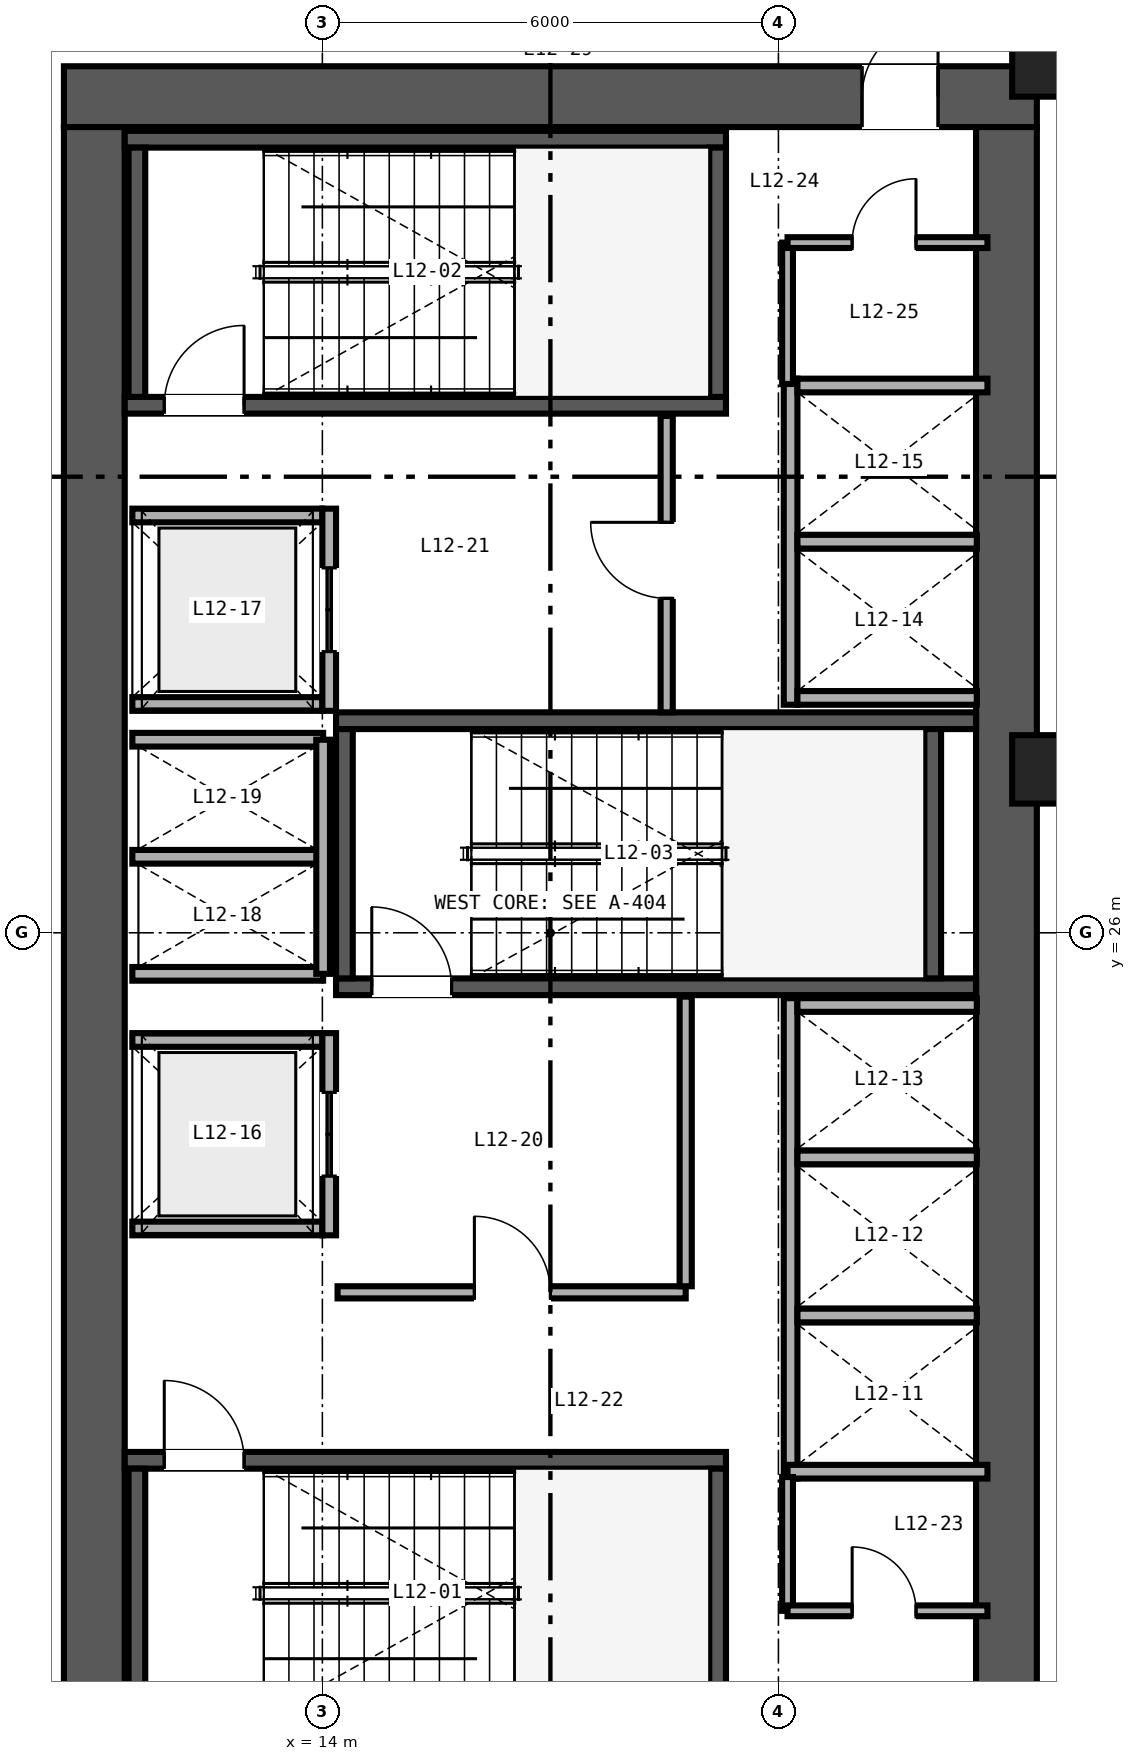
"""IFC4 building model, lengths in metres.
Left out: names, types, materials, properties, quantities, classifications, styles, units other than length and angle.
Written with IfcOpenShell. Run it as: python <this file> out.ifc"""

import sys

from ifc_helpers import new_model, si_unit, direction, frame, frame_2d, origin, origin_2d, place, context, subcontext, project, spatial, rectangle, hollow_rectangle, extrude, source, transform, mapped, element, fill, save


model = new_model("IFC4")
c1 = context("Model", 3, precision=1e-05, world=origin(), true_north=direction((0.0, 1.0)))
c2 = subcontext(c1, "Body", "Model", "MODEL_VIEW")
j1 = project(units=[si_unit("LENGTHUNIT", "METRE"), si_unit("PLANEANGLEUNIT", "RADIAN")], contexts=[c1])
p1 = place(None, origin())
s1 = spatial("IfcSite", under=j1, at=p1, CompositionType="ELEMENT")
p2 = place(p1, origin())
s2 = spatial("IfcBuilding", under=s1, at=p2, CompositionType="ELEMENT")
p3 = place(p2, frame((0.0, 0.0, 52.8)))
s3 = spatial("IfcBuildingStorey", under=s2, at=p3, CompositionType="ELEMENT", Elevation=52.8)
p4 = place(p3, frame((10.6, 37.0, 0.0), z_axis=(0.0, 0.0, 1.0), x_axis=(1.0, 0.0, 0.0)))
e1 = element("IfcWall", 1, at=p4, inside=s3, PredefinedType="SHEAR", context=c2, shape_type="SweptSolid", body=[
    extrude(rectangle(XDim=12.8, YDim=0.8, at=frame_2d((6.4, 0.0))), origin(), (0.0, 0.0, 1.0), 3.35),
])
p5 = place(p4, frame((10.5, 0.0, 0.0)))
e2 = element("IfcOpeningElement", 2, at=p5, cuts=e1, PredefinedType="OPENING", context=c2, shape_type="SweptSolid", body=[
    extrude(rectangle(XDim=1.0, YDim=2.15, at=frame_2d((0.5, 1.075))), frame((0.0, 0.41, 0.0), z_axis=(0.0, -1.0, 0.0), x_axis=(1.0, 0.0, 0.0)), (0.0, 0.0, 1.0), 0.82),
])
for number, where, z_axis, x_axis in (
    (3, (11.0, 15.4, 0.0), (0.0, 0.0, 1.0), (0.0, 1.0, 0.0)),
    (4, (23.0, 15.4, 0.0), (0.0, 0.0, 1.0), (0.0, 1.0, 0.0)),
):
    element("IfcWall", number, at=place(p3, frame(where, z_axis=z_axis, x_axis=x_axis)), inside=s3, PredefinedType="SHEAR", context=c2, shape_type="SweptSolid", body=[
        extrude(rectangle(XDim=21.2, YDim=0.8, at=frame_2d((10.6, 0.0))), origin(), (0.0, 0.0, 1.0), 3.35),
    ])
p6 = place(p3, frame((11.4, 19.06, 0.0), z_axis=(0.0, 0.0, 1.0), x_axis=(1.0, 0.0, 0.0)))
e5 = element("IfcWall", 5, at=p6, inside=s3, PredefinedType="SHEAR", context=c2, shape_type="SweptSolid", body=[
    extrude(rectangle(XDim=7.91, YDim=0.22, at=frame_2d((3.955, 0.0))), origin(), (0.0, 0.0, 1.0), 3.4),
])
p7 = place(p6, frame((0.52, 0.0, 0.0)))
e6 = element("IfcOpeningElement", 6, at=p7, cuts=e5, PredefinedType="OPENING", context=c2, shape_type="SweptSolid", body=[
    extrude(rectangle(XDim=1.05, YDim=2.15, at=frame_2d((0.525, 1.075))), frame((0.0, 0.12, 0.0), z_axis=(0.0, -1.0, 0.0), x_axis=(1.0, 0.0, 0.0)), (0.0, 0.0, 1.0), 0.24),
])
for number, where, z_axis, x_axis in (
    (7, (11.56, 15.67, 0.0), (0.0, 0.0, 1.0), (0.0, 1.0, 0.0)),
    (8, (19.2, 15.67, 0.0), (0.0, 0.0, 1.0), (0.0, 1.0, 0.0)),
):
    element("IfcWall", number, at=place(p3, frame(where, z_axis=z_axis, x_axis=x_axis)), inside=s3, PredefinedType="SHEAR", context=c2, shape_type="SweptSolid", body=[
        extrude(rectangle(XDim=3.28, YDim=0.22, at=frame_2d((1.64, 0.0))), origin(), (0.0, 0.0, 1.0), 3.4),
    ])
p8 = place(p3, frame((11.4, 32.94, 0.0), z_axis=(0.0, 0.0, 1.0), x_axis=(1.0, 0.0, 0.0)))
e9 = element("IfcWall", 9, at=p8, inside=s3, PredefinedType="SHEAR", context=c2, shape_type="SweptSolid", body=[
    extrude(rectangle(XDim=7.91, YDim=0.22, at=frame_2d((3.955, 0.0))), origin(), (0.0, 0.0, 1.0), 3.4),
])
p9 = place(p8, frame((0.52, 0.0, 0.0)))
e10 = element("IfcOpeningElement", 10, at=p9, cuts=e9, PredefinedType="OPENING", context=c2, shape_type="SweptSolid", body=[
    extrude(rectangle(XDim=1.05, YDim=2.15, at=frame_2d((0.525, 1.075))), frame((0.0, 0.12, 0.0), z_axis=(0.0, -1.0, 0.0), x_axis=(1.0, 0.0, 0.0)), (0.0, 0.0, 1.0), 0.24),
])
p10 = place(p3, frame((11.4, 36.44, 0.0), z_axis=(0.0, 0.0, 1.0), x_axis=(1.0, 0.0, 0.0)))
e11 = element("IfcWall", 11, at=p10, inside=s3, PredefinedType="SHEAR", context=c2, shape_type="SweptSolid", body=[
    extrude(rectangle(XDim=7.91, YDim=0.22, at=frame_2d((3.955, 0.0))), origin(), (0.0, 0.0, 1.0), 3.4),
])
for number, where, z_axis, x_axis in (
    (12, (11.56, 33.05, 0.0), (0.0, 0.0, 1.0), (0.0, 1.0, 0.0)),
    (13, (19.2, 33.05, 0.0), (0.0, 0.0, 1.0), (0.0, 1.0, 0.0)),
):
    element("IfcWall", number, at=place(p3, frame(where, z_axis=z_axis, x_axis=x_axis)), inside=s3, PredefinedType="SHEAR", context=c2, shape_type="SweptSolid", body=[
        extrude(rectangle(XDim=3.28, YDim=0.22, at=frame_2d((1.64, 0.0))), origin(), (0.0, 0.0, 1.0), 3.4),
    ])
p11 = place(p3, frame((14.18, 25.29, 0.0), z_axis=(0.0, 0.0, 1.0), x_axis=(1.0, 0.0, 0.0)))
e14 = element("IfcWall", 14, at=p11, inside=s3, PredefinedType="SHEAR", context=c2, shape_type="SweptSolid", body=[
    extrude(rectangle(XDim=8.42, YDim=0.22, at=frame_2d((4.21, 0.0))), origin(), (0.0, 0.0, 1.0), 3.4),
])
p12 = place(p11, frame((0.47, 0.0, 0.0)))
e15 = element("IfcOpeningElement", 15, at=p12, cuts=e14, PredefinedType="OPENING", context=c2, shape_type="SweptSolid", body=[
    extrude(rectangle(XDim=1.05, YDim=2.15, at=frame_2d((0.525, 1.075))), frame((0.0, 0.12, 0.0), z_axis=(0.0, -1.0, 0.0), x_axis=(1.0, 0.0, 0.0)), (0.0, 0.0, 1.0), 0.24),
])
p13 = place(p3, frame((14.18, 28.79, 0.0), z_axis=(0.0, 0.0, 1.0), x_axis=(1.0, 0.0, 0.0)))
e16 = element("IfcWall", 16, at=p13, inside=s3, PredefinedType="SHEAR", context=c2, shape_type="SweptSolid", body=[
    extrude(rectangle(XDim=8.42, YDim=0.22, at=frame_2d((4.21, 0.0))), origin(), (0.0, 0.0, 1.0), 3.4),
])
for number, where, z_axis, x_axis in (
    (17, (14.29, 25.4, 0.0), (0.0, 0.0, 1.0), (0.0, 1.0, 0.0)),
    (18, (22.03, 25.4, 0.0), (0.0, 0.0, 1.0), (0.0, 1.0, 0.0)),
):
    element("IfcWall", number, at=place(p3, frame(where, z_axis=z_axis, x_axis=x_axis)), inside=s3, PredefinedType="SHEAR", context=c2, shape_type="SweptSolid", body=[
        extrude(rectangle(XDim=3.28, YDim=0.22, at=frame_2d((1.64, 0.0))), origin(), (0.0, 0.0, 1.0), 3.4),
    ])
m1 = source(origin(), c2, "Body", "SweptSolid", [
    extrude(hollow_rectangle(XDim=0.85, YDim=0.9, WallThickness=0.04, at=origin_2d()), origin(), (0.0, 0.0, 1.0), 3.35),
])
for number, where, z_axis, x_axis in (
    (19, (23.5, 28.15, 0.0), (0.0, 0.0, 1.0), (1.0, 0.0, 0.0)),
    (20, (23.5, 37.45, 0.0), (0.0, 0.0, 1.0), (1.0, 0.0, 0.0)),
):
    element("IfcColumn", number, at=place(p3, frame(where, z_axis=z_axis, x_axis=x_axis)), inside=s3, PredefinedType="COLUMN", context=c2, shape_type="MappedRepresentation", body=[
        mapped(m1, transform((0.0, 0.0, 0.0), scale=1.0)),
    ])
p14 = place(p3, frame((20.16, 18.82, 0.0), z_axis=(0.0, 0.0, 1.0), x_axis=(0.0, 1.0, 0.0)))
e21 = element("IfcWall", 21, at=p14, inside=s3, PredefinedType="SOLIDWALL", context=c2, shape_type="SweptSolid", body=[
    extrude(rectangle(XDim=6.32, YDim=0.18, at=frame_2d((3.16, 0.0))), origin(), (0.0, 0.0, 1.0), 2.36),
])
p15 = place(p3, frame((20.12, 18.91, 0.0), z_axis=(0.0, 0.0, 1.0), x_axis=(1.0, 0.0, 0.0)))
e22 = element("IfcWall", 22, at=p15, inside=s3, PredefinedType="SOLIDWALL", context=c2, shape_type="SweptSolid", body=[
    extrude(rectangle(XDim=2.63, YDim=0.18, at=frame_2d((1.315, 0.0))), origin(), (0.0, 0.0, 1.0), 3.35),
])
p16 = place(p3, frame((20.25, 25.05, 0.0), z_axis=(0.0, 0.0, 1.0), x_axis=(1.0, 0.0, 0.0)))
e23 = element("IfcWall", 23, at=p16, inside=s3, PredefinedType="SOLIDWALL", context=c2, shape_type="SweptSolid", body=[
    extrude(rectangle(XDim=2.36, YDim=0.18, at=frame_2d((1.18, 0.0))), origin(), (0.0, 0.0, 1.0), 3.35),
])
p17 = place(p3, frame((20.25, 20.965, 0.0), z_axis=(0.0, 0.0, 1.0), x_axis=(1.0, 0.0, 0.0)))
e24 = element("IfcWall", 24, at=p17, inside=s3, PredefinedType="SOLIDWALL", context=c2, shape_type="SweptSolid", body=[
    extrude(rectangle(XDim=2.36, YDim=0.18, at=frame_2d((1.18, 0.0))), origin(), (0.0, 0.0, 1.0), 2.36),
])
p18 = place(p3, frame((20.25, 23.045, 0.0), z_axis=(0.0, 0.0, 1.0), x_axis=(1.0, 0.0, 0.0)))
e25 = element("IfcWall", 25, at=p18, inside=s3, PredefinedType="SOLIDWALL", context=c2, shape_type="SweptSolid", body=[
    extrude(rectangle(XDim=2.36, YDim=0.18, at=frame_2d((1.18, 0.0))), origin(), (0.0, 0.0, 1.0), 3.35),
])
p19 = place(p3, frame((20.16, 29.0, 0.0), z_axis=(0.0, 0.0, 1.0), x_axis=(0.0, 1.0, 0.0)))
e26 = element("IfcWall", 26, at=p19, inside=s3, PredefinedType="SOLIDWALL", context=c2, shape_type="SweptSolid", body=[
    extrude(rectangle(XDim=4.29, YDim=0.18, at=frame_2d((2.145, 0.0))), origin(), (0.0, 0.0, 1.0), 3.35),
])
p20 = place(p3, frame((20.25, 29.09, 0.0), z_axis=(0.0, 0.0, 1.0), x_axis=(1.0, 0.0, 0.0)))
e27 = element("IfcWall", 27, at=p20, inside=s3, PredefinedType="SOLIDWALL", context=c2, shape_type="SweptSolid", body=[
    extrude(rectangle(XDim=2.36, YDim=0.18, at=frame_2d((1.18, 0.0))), origin(), (0.0, 0.0, 1.0), 3.35),
])
p21 = place(p3, frame((20.25, 33.2, 0.0), z_axis=(0.0, 0.0, 1.0), x_axis=(1.0, 0.0, 0.0)))
e28 = element("IfcWall", 28, at=p21, inside=s3, PredefinedType="SOLIDWALL", context=c2, shape_type="SweptSolid", body=[
    extrude(rectangle(XDim=2.5, YDim=0.18, at=frame_2d((1.25, 0.0))), origin(), (0.0, 0.0, 1.0), 3.35),
])
p22 = place(p3, frame((20.25, 31.145, 0.0), z_axis=(0.0, 0.0, 1.0), x_axis=(1.0, 0.0, 0.0)))
e29 = element("IfcWall", 29, at=p22, inside=s3, PredefinedType="SOLIDWALL", context=c2, shape_type="SweptSolid", body=[
    extrude(rectangle(XDim=2.36, YDim=0.18, at=frame_2d((1.18, 0.0))), origin(), (0.0, 0.0, 1.0), 3.35),
])
for number, where, z_axis, x_axis in (
    (30, (11.5, 22.11, 0.0), (0.0, 0.0, 1.0), (1.0, 0.0, 0.0)),
    (31, (11.5, 24.59, 0.0), (0.0, 0.0, 1.0), (1.0, 0.0, 0.0)),
):
    element("IfcWall", number, at=place(p3, frame(where, z_axis=z_axis, x_axis=x_axis)), inside=s3, PredefinedType="SOLIDWALL", context=c2, shape_type="SweptSolid", body=[
        extrude(rectangle(XDim=2.5, YDim=0.18, at=frame_2d((1.25, 0.0))), origin(), (0.0, 0.0, 1.0), 3.35),
    ])
p23 = place(p3, frame((14.09, 22.02, 0.0), z_axis=(0.0, 0.0, 1.0), x_axis=(0.0, 1.0, 0.0)))
e32 = element("IfcWall", 32, at=p23, inside=s3, PredefinedType="SOLIDWALL", context=c2, shape_type="SweptSolid", body=[
    extrude(rectangle(XDim=2.66, YDim=0.18, at=frame_2d((1.33, 0.0))), origin(), (0.0, 0.0, 1.0), 3.35),
])
p24 = place(p23, frame((0.78, 0.0, 0.0)))
e33 = element("IfcOpeningElement", 33, at=p24, cuts=e32, PredefinedType="OPENING", context=c2, shape_type="SweptSolid", body=[
    extrude(rectangle(XDim=1.1, YDim=2.2, at=frame_2d((0.55, 1.1))), frame((0.0, 0.1, 0.0), z_axis=(0.0, -1.0, 0.0), x_axis=(1.0, 0.0, 0.0)), (0.0, 0.0, 1.0), 0.2),
])
for number, where, z_axis, x_axis in (
    (34, (11.5, 29.01, 0.0), (0.0, 0.0, 1.0), (1.0, 0.0, 0.0)),
    (35, (11.5, 31.49, 0.0), (0.0, 0.0, 1.0), (1.0, 0.0, 0.0)),
):
    element("IfcWall", number, at=place(p3, frame(where, z_axis=z_axis, x_axis=x_axis)), inside=s3, PredefinedType="SOLIDWALL", context=c2, shape_type="SweptSolid", body=[
        extrude(rectangle(XDim=2.5, YDim=0.18, at=frame_2d((1.25, 0.0))), origin(), (0.0, 0.0, 1.0), 3.35),
    ])
p25 = place(p3, frame((14.09, 28.92, 0.0), z_axis=(0.0, 0.0, 1.0), x_axis=(0.0, 1.0, 0.0)))
e36 = element("IfcWall", 36, at=p25, inside=s3, PredefinedType="SOLIDWALL", context=c2, shape_type="SweptSolid", body=[
    extrude(rectangle(XDim=2.66, YDim=0.18, at=frame_2d((1.33, 0.0))), origin(), (0.0, 0.0, 1.0), 3.35),
])
p26 = place(p25, frame((0.78, 0.0, 0.0)))
e37 = element("IfcOpeningElement", 37, at=p26, cuts=e36, PredefinedType="OPENING", context=c2, shape_type="SweptSolid", body=[
    extrude(rectangle(XDim=1.1, YDim=2.2, at=frame_2d((0.55, 1.1))), frame((0.0, 0.1, 0.0), z_axis=(0.0, -1.0, 0.0), x_axis=(1.0, 0.0, 0.0)), (0.0, 0.0, 1.0), 0.2),
])
for number, where, z_axis, x_axis in (
    (38, (11.5, 25.46, 0.0), (0.0, 0.0, 1.0), (1.0, 0.0, 0.0)),
    (39, (11.5, 27.0, 0.0), (0.0, 0.0, 1.0), (1.0, 0.0, 0.0)),
    (40, (11.5, 28.54, 0.0), (0.0, 0.0, 1.0), (1.0, 0.0, 0.0)),
):
    element("IfcWall", number, at=place(p3, frame(where, z_axis=z_axis, x_axis=x_axis)), inside=s3, PredefinedType="SOLIDWALL", context=c2, shape_type="SweptSolid", body=[
        extrude(rectangle(XDim=2.51, YDim=0.18, at=frame_2d((1.255, 0.0))), origin(), (0.0, 0.0, 1.0), 3.35),
    ])
p27 = place(p3, frame((14.01, 25.46, 0.0), z_axis=(0.0, 0.0, 1.0), x_axis=(0.0, 1.0, 0.0)))
e41 = element("IfcWall", 41, at=p27, inside=s3, PredefinedType="SOLIDWALL", context=c2, shape_type="SweptSolid", body=[
    extrude(rectangle(XDim=3.08, YDim=0.18, at=frame_2d((1.54, 0.0))), origin(), (0.0, 0.0, 1.0), 3.35),
])
p28 = place(p3, frame((14.2, 21.27, 0.0), z_axis=(0.0, 0.0, 1.0), x_axis=(1.0, 0.0, 0.0)))
e42 = element("IfcWall", 42, at=p28, inside=s3, PredefinedType="PARTITIONING", context=c2, shape_type="SweptSolid", body=[
    extrude(rectangle(XDim=4.58, YDim=0.16, at=frame_2d((2.29, 0.0))), origin(), (0.0, 0.0, 1.0), 3.35),
])
p29 = place(p28, frame((1.8, 0.0, 0.0)))
e43 = element("IfcOpeningElement", 43, at=p29, cuts=e42, PredefinedType="OPENING", context=c2, shape_type="SweptSolid", body=[
    extrude(rectangle(XDim=1.0, YDim=2.15, at=frame_2d((0.5, 1.075))), frame((0.0, 0.09, 0.0), z_axis=(0.0, -1.0, 0.0), x_axis=(1.0, 0.0, 0.0)), (0.0, 0.0, 1.0), 0.18),
])
p30 = place(p3, frame((18.78, 21.35, 0.0), z_axis=(0.0, 0.0, 1.0), x_axis=(0.0, 1.0, 0.0)))
e44 = element("IfcWall", 44, at=p30, inside=s3, PredefinedType="PARTITIONING", context=c2, shape_type="SweptSolid", body=[
    extrude(rectangle(XDim=3.81, YDim=0.16, at=frame_2d((1.905, 0.0))), origin(), (0.0, 0.0, 1.0), 3.35),
])
p31 = place(p3, frame((18.53, 28.9, 0.0), z_axis=(0.0, 0.0, 1.0), x_axis=(0.0, 1.0, 0.0)))
e45 = element("IfcWall", 45, at=p31, inside=s3, PredefinedType="PARTITIONING", context=c2, shape_type="SweptSolid", body=[
    extrude(rectangle(XDim=3.9, YDim=0.16, at=frame_2d((1.95, 0.0))), origin(), (0.0, 0.0, 1.0), 3.35),
])
p32 = place(p31, frame((1.5, 0.0, 0.0)))
e46 = element("IfcOpeningElement", 46, at=p32, cuts=e45, PredefinedType="OPENING", context=c2, shape_type="SweptSolid", body=[
    extrude(rectangle(XDim=1.0, YDim=2.15, at=frame_2d((0.5, 1.075))), frame((0.0, 0.09, 0.0), z_axis=(0.0, -1.0, 0.0), x_axis=(1.0, 0.0, 0.0)), (0.0, 0.0, 1.0), 0.18),
])
p33 = place(p3, frame((20.12, 17.08, 0.0), z_axis=(0.0, 0.0, 1.0), x_axis=(0.0, 1.0, 0.0)))
e47 = element("IfcWall", 47, at=p33, inside=s3, PredefinedType="PARTITIONING", context=c2, shape_type="SweptSolid", body=[
    extrude(rectangle(XDim=1.76, YDim=0.142, at=frame_2d((0.88, 0.0))), origin(), (0.0, 0.0, 1.0), 3.35),
])
p34 = place(p3, frame((20.12, 17.08, 0.0), z_axis=(0.0, 0.0, 1.0), x_axis=(1.0, 0.0, 0.0)))
e48 = element("IfcWall", 48, at=p34, inside=s3, PredefinedType="PARTITIONING", context=c2, shape_type="SweptSolid", body=[
    extrude(rectangle(XDim=2.63, YDim=0.142, at=frame_2d((1.315, 0.0))), origin(), (0.0, 0.0, 1.0), 3.35),
])
p35 = place(p34, frame((0.85, 0.0, 0.0)))
e49 = element("IfcOpeningElement", 49, at=p35, cuts=e48, PredefinedType="OPENING", context=c2, shape_type="SweptSolid", body=[
    extrude(rectangle(XDim=0.84, YDim=2.1, at=frame_2d((0.42, 1.05))), frame((0.0, 0.081, 0.0), z_axis=(0.0, -1.0, 0.0), x_axis=(1.0, 0.0, 0.0)), (0.0, 0.0, 1.0), 0.162),
])
p36 = place(p3, frame((20.12, 33.22, 0.0), z_axis=(0.0, 0.0, 1.0), x_axis=(0.0, 1.0, 0.0)))
e50 = element("IfcWall", 50, at=p36, inside=s3, PredefinedType="PARTITIONING", context=c2, shape_type="SweptSolid", body=[
    extrude(rectangle(XDim=1.86, YDim=0.142, at=frame_2d((0.93, 0.0))), origin(), (0.0, 0.0, 1.0), 3.35),
])
p37 = place(p3, frame((20.12, 35.08, 0.0), z_axis=(0.0, 0.0, 1.0), x_axis=(1.0, 0.0, 0.0)))
e51 = element("IfcWall", 51, at=p37, inside=s3, PredefinedType="PARTITIONING", context=c2, shape_type="SweptSolid", body=[
    extrude(rectangle(XDim=2.63, YDim=0.142, at=frame_2d((1.315, 0.0))), origin(), (0.0, 0.0, 1.0), 3.35),
])
p38 = place(p37, frame((0.85, 0.0, 0.0)))
e52 = element("IfcOpeningElement", 52, at=p38, cuts=e51, PredefinedType="OPENING", context=c2, shape_type="SweptSolid", body=[
    extrude(rectangle(XDim=0.84, YDim=2.1, at=frame_2d((0.42, 1.05))), frame((0.0, 0.081, 0.0), z_axis=(0.0, -1.0, 0.0), x_axis=(1.0, 0.0, 0.0)), (0.0, 0.0, 1.0), 0.162),
])
m2 = source(origin(), c2, "Body", "SweptSolid", [
    extrude(rectangle(XDim=1.05, YDim=2.15, at=frame_2d((0.525, 1.075))), frame((0.0, 0.025, 0.0), z_axis=(0.0, -1.0, 0.0), x_axis=(1.0, 0.0, 0.0)), (0.0, 0.0, 1.0), 0.05),
])
p39 = place(p7, origin())
e53 = element("IfcDoor", 53, at=p39, inside=s3, OperationType="SINGLE_SWING_LEFT", PredefinedType="DOOR", context=c2, shape_type="MappedRepresentation", body=[
    mapped(m2, transform((0.0, 0.0, 0.0), scale=1.0)),
])
fill(e6, e53)
p40 = place(p9, origin())
e54 = element("IfcDoor", 54, at=p40, inside=s3, OperationType="SINGLE_SWING_RIGHT", PredefinedType="DOOR", context=c2, shape_type="MappedRepresentation", body=[
    mapped(m2, transform((0.0, 0.0, 0.0), scale=1.0)),
])
fill(e10, e54)
p41 = place(p12, origin())
e55 = element("IfcDoor", 55, at=p41, inside=s3, OperationType="SINGLE_SWING_LEFT", PredefinedType="DOOR", context=c2, shape_type="MappedRepresentation", body=[
    mapped(m2, transform((0.0, 0.0, 0.0), scale=1.0)),
])
fill(e15, e55)
m3 = source(origin(), c2, "Body", "SweptSolid", [
    extrude(rectangle(XDim=1.1, YDim=2.2, at=frame_2d((0.55, 1.1))), frame((0.0, 0.025, 0.0), z_axis=(0.0, -1.0, 0.0), x_axis=(1.0, 0.0, 0.0)), (0.0, 0.0, 1.0), 0.05),
])
p42 = place(p24, origin())
e56 = element("IfcDoor", 56, at=p42, inside=s3, OperationType="DOUBLE_DOOR_SLIDING", PredefinedType="DOOR", context=c2, shape_type="MappedRepresentation", body=[
    mapped(m3, transform((0.0, 0.0, 0.0), scale=1.0)),
])
fill(e33, e56)
p43 = place(p26, origin())
e57 = element("IfcDoor", 57, at=p43, inside=s3, OperationType="DOUBLE_DOOR_SLIDING", PredefinedType="DOOR", context=c2, shape_type="MappedRepresentation", body=[
    mapped(m3, transform((0.0, 0.0, 0.0), scale=1.0)),
])
fill(e37, e57)
m4 = source(origin(), c2, "Body", "SweptSolid", [
    extrude(rectangle(XDim=1.0, YDim=2.15, at=frame_2d((0.5, 1.075))), frame((0.0, 0.025, 0.0), z_axis=(0.0, -1.0, 0.0), x_axis=(1.0, 0.0, 0.0)), (0.0, 0.0, 1.0), 0.05),
])
p44 = place(p29, origin())
e58 = element("IfcDoor", 58, at=p44, inside=s3, OperationType="SINGLE_SWING_LEFT", PredefinedType="DOOR", context=c2, shape_type="MappedRepresentation", body=[
    mapped(m4, transform((0.0, 0.0, 0.0), scale=1.0)),
])
fill(e43, e58)
p45 = place(p32, origin())
e59 = element("IfcDoor", 59, at=p45, inside=s3, OperationType="SINGLE_SWING_RIGHT", PredefinedType="DOOR", context=c2, shape_type="MappedRepresentation", body=[
    mapped(m4, transform((0.0, 0.0, 0.0), scale=1.0)),
])
fill(e46, e59)
m5 = source(origin(), c2, "Body", "SweptSolid", [
    extrude(rectangle(XDim=0.84, YDim=2.1, at=frame_2d((0.42, 1.05))), frame((0.0, 0.025, 0.0), z_axis=(0.0, -1.0, 0.0), x_axis=(1.0, 0.0, 0.0)), (0.0, 0.0, 1.0), 0.05),
])
p46 = place(p35, origin())
e60 = element("IfcDoor", 60, at=p46, inside=s3, OperationType="SINGLE_SWING_LEFT", PredefinedType="DOOR", context=c2, shape_type="MappedRepresentation", body=[
    mapped(m5, transform((0.0, 0.0, 0.0), scale=1.0)),
])
fill(e49, e60)
p47 = place(p38, origin())
e61 = element("IfcDoor", 61, at=p47, inside=s3, OperationType="SINGLE_SWING_RIGHT", PredefinedType="DOOR", context=c2, shape_type="MappedRepresentation", body=[
    mapped(m5, transform((0.0, 0.0, 0.0), scale=1.0)),
])
fill(e52, e61)
p48 = place(p5, origin())
e62 = element("IfcDoor", 62, at=p48, inside=s3, OperationType="SINGLE_SWING_RIGHT", PredefinedType="DOOR", context=c2, shape_type="MappedRepresentation", body=[
    mapped(m4, transform((0.0, 0.0, 0.0), scale=1.0)),
])
fill(e2, e62)
save(model, sys.argv[1])
